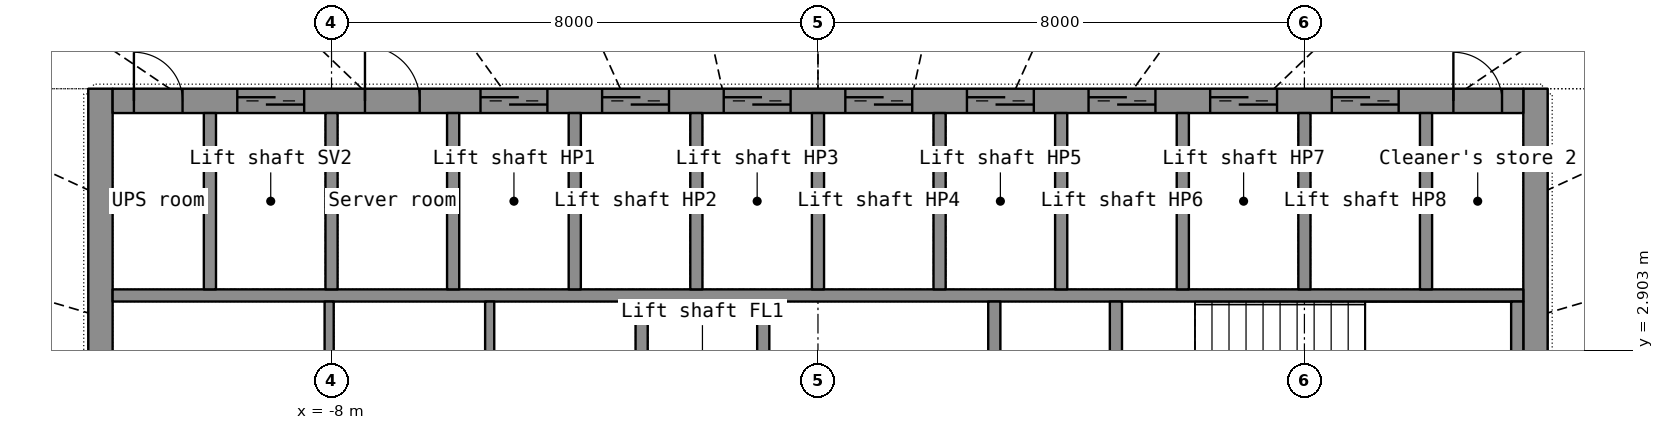
"""IFC4 building model, lengths in metres.
Left out: names, types, materials, properties, quantities, classifications, styles, units other than length and angle.
Written with IfcOpenShell. Run it as: python <this file> out.ifc"""

import sys

from ifc_helpers import new_model, si_unit, direction, frame, frame_2d, origin, place, context, subcontext, project, spatial, rectangle, extrude, element, fill, save


model = new_model("IFC4")
c1 = context("Model", 3, precision=1e-05, world=origin(), true_north=direction((0.0, 1.0)))
c2 = subcontext(c1, "Body", "Model", "MODEL_VIEW")
j1 = project(units=[si_unit("LENGTHUNIT", "METRE"), si_unit("PLANEANGLEUNIT", "RADIAN")], contexts=[c1])
p1 = place(None, origin())
s1 = spatial("IfcSite", under=j1, at=p1, CompositionType="ELEMENT")
p2 = place(p1, origin())
s2 = spatial("IfcBuilding", under=s1, at=p2, CompositionType="ELEMENT")
p3 = place(p2, frame((0.0, 0.0, 228.2)))
s3 = spatial("IfcBuildingStorey", under=s2, at=p3, CompositionType="ELEMENT", Elevation=228.2)
p4 = place(p3, frame((-11.8, -7.2, 0.0), z_axis=(0.0, 0.0, 1.0), x_axis=(0.0, 1.0, 0.0)))
e1 = element("IfcWall", 1, at=p4, inside=s3, PredefinedType="SHEAR", context=c2, shape_type="SweptSolid", body=[
    extrude(rectangle(XDim=14.4, YDim=0.4, at=frame_2d((7.2, 0.0))), origin(), (0.0, 0.0, 1.0), 3.3),
])
p5 = place(p4, frame((6.5, 0.0, 0.0)))
e2 = element("IfcOpeningElement", 2, at=p5, cuts=e1, PredefinedType="OPENING", context=c2, shape_type="SweptSolid", body=[
    extrude(rectangle(XDim=1.4, YDim=2.2, at=frame_2d((0.7, 1.1))), frame((0.0, 0.21, 0.0), z_axis=(0.0, -1.0, 0.0), x_axis=(1.0, 0.0, 0.0)), (0.0, 0.0, 1.0), 0.42),
])
p6 = place(p3, frame((11.8, -7.2, 0.0), z_axis=(0.0, 0.0, 1.0), x_axis=(0.0, 1.0, 0.0)))
e3 = element("IfcWall", 3, at=p6, inside=s3, PredefinedType="SHEAR", context=c2, shape_type="SweptSolid", body=[
    extrude(rectangle(XDim=14.4, YDim=0.4, at=frame_2d((7.2, 0.0))), origin(), (0.0, 0.0, 1.0), 3.3),
])
p7 = place(p6, frame((6.5, 0.0, 0.0)))
e4 = element("IfcOpeningElement", 4, at=p7, cuts=e3, PredefinedType="OPENING", context=c2, shape_type="SweptSolid", body=[
    extrude(rectangle(XDim=1.4, YDim=2.2, at=frame_2d((0.7, 1.1))), frame((0.0, 0.21, 0.0), z_axis=(0.0, -1.0, 0.0), x_axis=(1.0, 0.0, 0.0)), (0.0, 0.0, 1.0), 0.42),
])
p8 = place(p3, frame((-11.6, 7.0, 0.0), z_axis=(0.0, 0.0, 1.0), x_axis=(1.0, 0.0, 0.0)))
e5 = element("IfcWall", 5, at=p8, inside=s3, PredefinedType="SHEAR", context=c2, shape_type="SweptSolid", body=[
    extrude(rectangle(XDim=23.2, YDim=0.4, at=frame_2d((11.6, 0.0))), origin(), (0.0, 0.0, 1.0), 3.3),
])
p9 = place(p8, frame((2.05, 0.0, 0.0)))
e6 = element("IfcOpeningElement", 6, at=p9, cuts=e5, PredefinedType="OPENING", context=c2, shape_type="SweptSolid", body=[
    extrude(rectangle(XDim=1.1, YDim=2.2, at=frame_2d((0.55, 1.1))), frame((0.0, 0.21, 0.0), z_axis=(0.0, -1.0, 0.0), x_axis=(1.0, 0.0, 0.0)), (0.0, 0.0, 1.0), 0.42),
])
p10 = place(p8, frame((6.05, 0.0, 0.0)))
e7 = element("IfcOpeningElement", 7, at=p10, cuts=e5, PredefinedType="OPENING", context=c2, shape_type="SweptSolid", body=[
    extrude(rectangle(XDim=1.1, YDim=2.2, at=frame_2d((0.55, 1.1))), frame((0.0, 0.21, 0.0), z_axis=(0.0, -1.0, 0.0), x_axis=(1.0, 0.0, 0.0)), (0.0, 0.0, 1.0), 0.42),
])
p11 = place(p8, frame((8.05, 0.0, 0.0)))
e8 = element("IfcOpeningElement", 8, at=p11, cuts=e5, PredefinedType="OPENING", context=c2, shape_type="SweptSolid", body=[
    extrude(rectangle(XDim=1.1, YDim=2.2, at=frame_2d((0.55, 1.1))), frame((0.0, 0.21, 0.0), z_axis=(0.0, -1.0, 0.0), x_axis=(1.0, 0.0, 0.0)), (0.0, 0.0, 1.0), 0.42),
])
p12 = place(p8, frame((10.05, 0.0, 0.0)))
e9 = element("IfcOpeningElement", 9, at=p12, cuts=e5, PredefinedType="OPENING", context=c2, shape_type="SweptSolid", body=[
    extrude(rectangle(XDim=1.1, YDim=2.2, at=frame_2d((0.55, 1.1))), frame((0.0, 0.21, 0.0), z_axis=(0.0, -1.0, 0.0), x_axis=(1.0, 0.0, 0.0)), (0.0, 0.0, 1.0), 0.42),
])
p13 = place(p8, frame((12.05, 0.0, 0.0)))
e10 = element("IfcOpeningElement", 10, at=p13, cuts=e5, PredefinedType="OPENING", context=c2, shape_type="SweptSolid", body=[
    extrude(rectangle(XDim=1.1, YDim=2.2, at=frame_2d((0.55, 1.1))), frame((0.0, 0.21, 0.0), z_axis=(0.0, -1.0, 0.0), x_axis=(1.0, 0.0, 0.0)), (0.0, 0.0, 1.0), 0.42),
])
p14 = place(p8, frame((14.05, 0.0, 0.0)))
e11 = element("IfcOpeningElement", 11, at=p14, cuts=e5, PredefinedType="OPENING", context=c2, shape_type="SweptSolid", body=[
    extrude(rectangle(XDim=1.1, YDim=2.2, at=frame_2d((0.55, 1.1))), frame((0.0, 0.21, 0.0), z_axis=(0.0, -1.0, 0.0), x_axis=(1.0, 0.0, 0.0)), (0.0, 0.0, 1.0), 0.42),
])
p15 = place(p8, frame((16.05, 0.0, 0.0)))
e12 = element("IfcOpeningElement", 12, at=p15, cuts=e5, PredefinedType="OPENING", context=c2, shape_type="SweptSolid", body=[
    extrude(rectangle(XDim=1.1, YDim=2.2, at=frame_2d((0.55, 1.1))), frame((0.0, 0.21, 0.0), z_axis=(0.0, -1.0, 0.0), x_axis=(1.0, 0.0, 0.0)), (0.0, 0.0, 1.0), 0.42),
])
p16 = place(p8, frame((18.05, 0.0, 0.0)))
e13 = element("IfcOpeningElement", 13, at=p16, cuts=e5, PredefinedType="OPENING", context=c2, shape_type="SweptSolid", body=[
    extrude(rectangle(XDim=1.1, YDim=2.2, at=frame_2d((0.55, 1.1))), frame((0.0, 0.21, 0.0), z_axis=(0.0, -1.0, 0.0), x_axis=(1.0, 0.0, 0.0)), (0.0, 0.0, 1.0), 0.42),
])
p17 = place(p8, frame((20.05, 0.0, 0.0)))
e14 = element("IfcOpeningElement", 14, at=p17, cuts=e5, PredefinedType="OPENING", context=c2, shape_type="SweptSolid", body=[
    extrude(rectangle(XDim=1.1, YDim=2.2, at=frame_2d((0.55, 1.1))), frame((0.0, 0.21, 0.0), z_axis=(0.0, -1.0, 0.0), x_axis=(1.0, 0.0, 0.0)), (0.0, 0.0, 1.0), 0.42),
])
p18 = place(p8, frame((4.15, 0.0, 0.0)))
e15 = element("IfcOpeningElement", 15, at=p18, cuts=e5, PredefinedType="OPENING", context=c2, shape_type="SweptSolid", body=[
    extrude(rectangle(XDim=0.9, YDim=2.1, at=frame_2d((0.45, 1.05))), frame((0.0, 0.21, 0.0), z_axis=(0.0, -1.0, 0.0), x_axis=(1.0, 0.0, 0.0)), (0.0, 0.0, 1.0), 0.42),
])
p19 = place(p8, frame((0.35, 0.0, 0.0)))
e16 = element("IfcOpeningElement", 16, at=p19, cuts=e5, PredefinedType="OPENING", context=c2, shape_type="SweptSolid", body=[
    extrude(rectangle(XDim=0.8, YDim=2.05, at=frame_2d((0.4, 1.025))), frame((0.0, 0.21, 0.0), z_axis=(0.0, -1.0, 0.0), x_axis=(1.0, 0.0, 0.0)), (0.0, 0.0, 1.0), 0.42),
])
p20 = place(p8, frame((22.05, 0.0, 0.0)))
e17 = element("IfcOpeningElement", 17, at=p20, cuts=e5, PredefinedType="OPENING", context=c2, shape_type="SweptSolid", body=[
    extrude(rectangle(XDim=0.8, YDim=2.05, at=frame_2d((0.4, 1.025))), frame((0.0, 0.21, 0.0), z_axis=(0.0, -1.0, 0.0), x_axis=(1.0, 0.0, 0.0)), (0.0, 0.0, 1.0), 0.42),
])
p21 = place(p3, frame((-11.6, 3.8, 0.0), z_axis=(0.0, 0.0, 1.0), x_axis=(1.0, 0.0, 0.0)))
e18 = element("IfcWall", 18, at=p21, inside=s3, PredefinedType="SHEAR", context=c2, shape_type="SweptSolid", body=[
    extrude(rectangle(XDim=23.2, YDim=0.2, at=frame_2d((11.6, 0.0))), origin(), (0.0, 0.0, 1.0), 3.3),
])
for number, where, z_axis, x_axis in (
    (19, (-10.0, 3.9, 0.0), (0.0, 0.0, 1.0), (0.0, 1.0, 0.0)),
    (20, (-8.0, 3.9, 0.0), (0.0, 0.0, 1.0), (0.0, 1.0, 0.0)),
    (21, (-6.0, 3.9, 0.0), (0.0, 0.0, 1.0), (0.0, 1.0, 0.0)),
    (22, (-4.0, 3.9, 0.0), (0.0, 0.0, 1.0), (0.0, 1.0, 0.0)),
    (23, (-2.0, 3.9, 0.0), (0.0, 0.0, 1.0), (0.0, 1.0, 0.0)),
    (24, (0.0, 3.9, 0.0), (0.0, 0.0, 1.0), (0.0, 1.0, 0.0)),
    (25, (2.0, 3.9, 0.0), (0.0, 0.0, 1.0), (0.0, 1.0, 0.0)),
    (26, (4.0, 3.9, 0.0), (0.0, 0.0, 1.0), (0.0, 1.0, 0.0)),
    (27, (6.0, 3.9, 0.0), (0.0, 0.0, 1.0), (0.0, 1.0, 0.0)),
    (28, (8.0, 3.9, 0.0), (0.0, 0.0, 1.0), (0.0, 1.0, 0.0)),
    (29, (10.0, 3.9, 0.0), (0.0, 0.0, 1.0), (0.0, 1.0, 0.0)),
):
    element("IfcWall", number, at=place(p3, frame(where, z_axis=z_axis, x_axis=x_axis)), inside=s3, PredefinedType="SHEAR", context=c2, shape_type="SweptSolid", body=[
        extrude(rectangle(XDim=2.9, YDim=0.2, at=frame_2d((1.45, 0.0))), origin(), (0.0, 0.0, 1.0), 3.3),
    ])
p22 = place(p3, frame((-2.9, -3.7, 0.0), z_axis=(0.0, 0.0, 1.0), x_axis=(0.0, 1.0, 0.0)))
e30 = element("IfcWall", 30, at=p22, inside=s3, PredefinedType="SHEAR", context=c2, shape_type="SweptSolid", body=[
    extrude(rectangle(XDim=7.4, YDim=0.2, at=frame_2d((3.7, 0.0))), origin(), (0.0, 0.0, 1.0), 3.3),
])
p23 = place(p22, frame((3.1, 0.0, 0.0)))
e31 = element("IfcOpeningElement", 31, at=p23, cuts=e30, PredefinedType="OPENING", context=c2, shape_type="SweptSolid", body=[
    extrude(rectangle(XDim=1.2, YDim=2.2, at=frame_2d((0.6, 1.1))), frame((0.0, 0.11, 0.0), z_axis=(0.0, -1.0, 0.0), x_axis=(1.0, 0.0, 0.0)), (0.0, 0.0, 1.0), 0.22),
])
p24 = place(p3, frame((2.9, -3.7, 0.0), z_axis=(0.0, 0.0, 1.0), x_axis=(0.0, 1.0, 0.0)))
e32 = element("IfcWall", 32, at=p24, inside=s3, PredefinedType="SHEAR", context=c2, shape_type="SweptSolid", body=[
    extrude(rectangle(XDim=7.4, YDim=0.2, at=frame_2d((3.7, 0.0))), origin(), (0.0, 0.0, 1.0), 3.3),
])
p25 = place(p24, frame((3.1, 0.0, 0.0)))
e33 = element("IfcOpeningElement", 33, at=p25, cuts=e32, PredefinedType="OPENING", context=c2, shape_type="SweptSolid", body=[
    extrude(rectangle(XDim=1.2, YDim=2.2, at=frame_2d((0.6, 1.1))), frame((0.0, 0.11, 0.0), z_axis=(0.0, -1.0, 0.0), x_axis=(1.0, 0.0, 0.0)), (0.0, 0.0, 1.0), 0.22),
])
for number, where, z_axis, x_axis in (
    (34, (-0.9, 1.35, 0.0), (0.0, 0.0, 1.0), (0.0, 1.0, 0.0)),
    (35, (11.5, 1.35, 0.0), (0.0, 0.0, 1.0), (0.0, 1.0, 0.0)),
    (36, (4.9, 1.35, 0.0), (0.0, 0.0, 1.0), (0.0, 1.0, 0.0)),
):
    element("IfcWall", number, at=place(p3, frame(where, z_axis=z_axis, x_axis=x_axis)), inside=s3, PredefinedType="SHEAR", context=c2, shape_type="SweptSolid", body=[
        extrude(rectangle(XDim=2.35, YDim=0.2, at=frame_2d((1.175, 0.0))), origin(), (0.0, 0.0, 1.0), 3.3),
    ])
for number, where, z_axis, x_axis in (
    (37, (-8.039, 1.35, 0.0), (0.0, 0.0, 1.0), (0.0, 1.0, 0.0)),
    (38, (-5.399, 1.35, 0.0), (0.0, 0.0, 1.0), (0.0, 1.0, 0.0)),
):
    element("IfcWall", number, at=place(p3, frame(where, z_axis=z_axis, x_axis=x_axis)), inside=s3, PredefinedType="PARTITIONING", context=c2, shape_type="SweptSolid", body=[
        extrude(rectangle(XDim=2.35, YDim=0.15, at=frame_2d((1.175, 0.0))), origin(), (0.0, 0.0, 1.0), 3.3),
    ])
p26 = place(p9, origin())
e39 = element("IfcDoor", 39, at=p26, inside=s3, OperationType="DOUBLE_DOOR_SLIDING", PredefinedType="DOOR", context=c2, shape_type="SweptSolid", body=[
    extrude(rectangle(XDim=1.1, YDim=2.2, at=frame_2d((0.55, 1.1))), frame((0.0, 0.025, 0.0), z_axis=(0.0, -1.0, 0.0), x_axis=(1.0, 0.0, 0.0)), (0.0, 0.0, 1.0), 0.05),
])
fill(e6, e39)
p27 = place(p10, origin())
e40 = element("IfcDoor", 40, at=p27, inside=s3, OperationType="DOUBLE_DOOR_SLIDING", PredefinedType="DOOR", context=c2, shape_type="SweptSolid", body=[
    extrude(rectangle(XDim=1.1, YDim=2.2, at=frame_2d((0.55, 1.1))), frame((0.0, 0.025, 0.0), z_axis=(0.0, -1.0, 0.0), x_axis=(1.0, 0.0, 0.0)), (0.0, 0.0, 1.0), 0.05),
])
fill(e7, e40)
p28 = place(p11, origin())
e41 = element("IfcDoor", 41, at=p28, inside=s3, OperationType="DOUBLE_DOOR_SLIDING", PredefinedType="DOOR", context=c2, shape_type="SweptSolid", body=[
    extrude(rectangle(XDim=1.1, YDim=2.2, at=frame_2d((0.55, 1.1))), frame((0.0, 0.025, 0.0), z_axis=(0.0, -1.0, 0.0), x_axis=(1.0, 0.0, 0.0)), (0.0, 0.0, 1.0), 0.05),
])
fill(e8, e41)
p29 = place(p12, origin())
e42 = element("IfcDoor", 42, at=p29, inside=s3, OperationType="DOUBLE_DOOR_SLIDING", PredefinedType="DOOR", context=c2, shape_type="SweptSolid", body=[
    extrude(rectangle(XDim=1.1, YDim=2.2, at=frame_2d((0.55, 1.1))), frame((0.0, 0.025, 0.0), z_axis=(0.0, -1.0, 0.0), x_axis=(1.0, 0.0, 0.0)), (0.0, 0.0, 1.0), 0.05),
])
fill(e9, e42)
p30 = place(p13, origin())
e43 = element("IfcDoor", 43, at=p30, inside=s3, OperationType="DOUBLE_DOOR_SLIDING", PredefinedType="DOOR", context=c2, shape_type="SweptSolid", body=[
    extrude(rectangle(XDim=1.1, YDim=2.2, at=frame_2d((0.55, 1.1))), frame((0.0, 0.025, 0.0), z_axis=(0.0, -1.0, 0.0), x_axis=(1.0, 0.0, 0.0)), (0.0, 0.0, 1.0), 0.05),
])
fill(e10, e43)
p31 = place(p14, origin())
e44 = element("IfcDoor", 44, at=p31, inside=s3, OperationType="DOUBLE_DOOR_SLIDING", PredefinedType="DOOR", context=c2, shape_type="SweptSolid", body=[
    extrude(rectangle(XDim=1.1, YDim=2.2, at=frame_2d((0.55, 1.1))), frame((0.0, 0.025, 0.0), z_axis=(0.0, -1.0, 0.0), x_axis=(1.0, 0.0, 0.0)), (0.0, 0.0, 1.0), 0.05),
])
fill(e11, e44)
p32 = place(p15, origin())
e45 = element("IfcDoor", 45, at=p32, inside=s3, OperationType="DOUBLE_DOOR_SLIDING", PredefinedType="DOOR", context=c2, shape_type="SweptSolid", body=[
    extrude(rectangle(XDim=1.1, YDim=2.2, at=frame_2d((0.55, 1.1))), frame((0.0, 0.025, 0.0), z_axis=(0.0, -1.0, 0.0), x_axis=(1.0, 0.0, 0.0)), (0.0, 0.0, 1.0), 0.05),
])
fill(e12, e45)
p33 = place(p16, origin())
e46 = element("IfcDoor", 46, at=p33, inside=s3, OperationType="DOUBLE_DOOR_SLIDING", PredefinedType="DOOR", context=c2, shape_type="SweptSolid", body=[
    extrude(rectangle(XDim=1.1, YDim=2.2, at=frame_2d((0.55, 1.1))), frame((0.0, 0.025, 0.0), z_axis=(0.0, -1.0, 0.0), x_axis=(1.0, 0.0, 0.0)), (0.0, 0.0, 1.0), 0.05),
])
fill(e13, e46)
p34 = place(p17, origin())
e47 = element("IfcDoor", 47, at=p34, inside=s3, OperationType="DOUBLE_DOOR_SLIDING", PredefinedType="DOOR", context=c2, shape_type="SweptSolid", body=[
    extrude(rectangle(XDim=1.1, YDim=2.2, at=frame_2d((0.55, 1.1))), frame((0.0, 0.025, 0.0), z_axis=(0.0, -1.0, 0.0), x_axis=(1.0, 0.0, 0.0)), (0.0, 0.0, 1.0), 0.05),
])
fill(e14, e47)
p35 = place(p18, origin())
e48 = element("IfcDoor", 48, at=p35, inside=s3, OperationType="SINGLE_SWING_LEFT", PredefinedType="DOOR", context=c2, shape_type="SweptSolid", body=[
    extrude(rectangle(XDim=0.9, YDim=2.1, at=frame_2d((0.45, 1.05))), frame((0.0, 0.025, 0.0), z_axis=(0.0, -1.0, 0.0), x_axis=(1.0, 0.0, 0.0)), (0.0, 0.0, 1.0), 0.05),
])
fill(e15, e48)
p36 = place(p19, origin())
e49 = element("IfcDoor", 49, at=p36, inside=s3, OperationType="SINGLE_SWING_LEFT", PredefinedType="DOOR", context=c2, shape_type="SweptSolid", body=[
    extrude(rectangle(XDim=0.8, YDim=2.05, at=frame_2d((0.4, 1.025))), frame((0.0, 0.025, 0.0), z_axis=(0.0, -1.0, 0.0), x_axis=(1.0, 0.0, 0.0)), (0.0, 0.0, 1.0), 0.05),
])
fill(e16, e49)
p37 = place(p20, origin())
e50 = element("IfcDoor", 50, at=p37, inside=s3, OperationType="SINGLE_SWING_LEFT", PredefinedType="DOOR", context=c2, shape_type="SweptSolid", body=[
    extrude(rectangle(XDim=0.8, YDim=2.05, at=frame_2d((0.4, 1.025))), frame((0.0, 0.025, 0.0), z_axis=(0.0, -1.0, 0.0), x_axis=(1.0, 0.0, 0.0)), (0.0, 0.0, 1.0), 0.05),
])
fill(e17, e50)
save(model, sys.argv[1])
